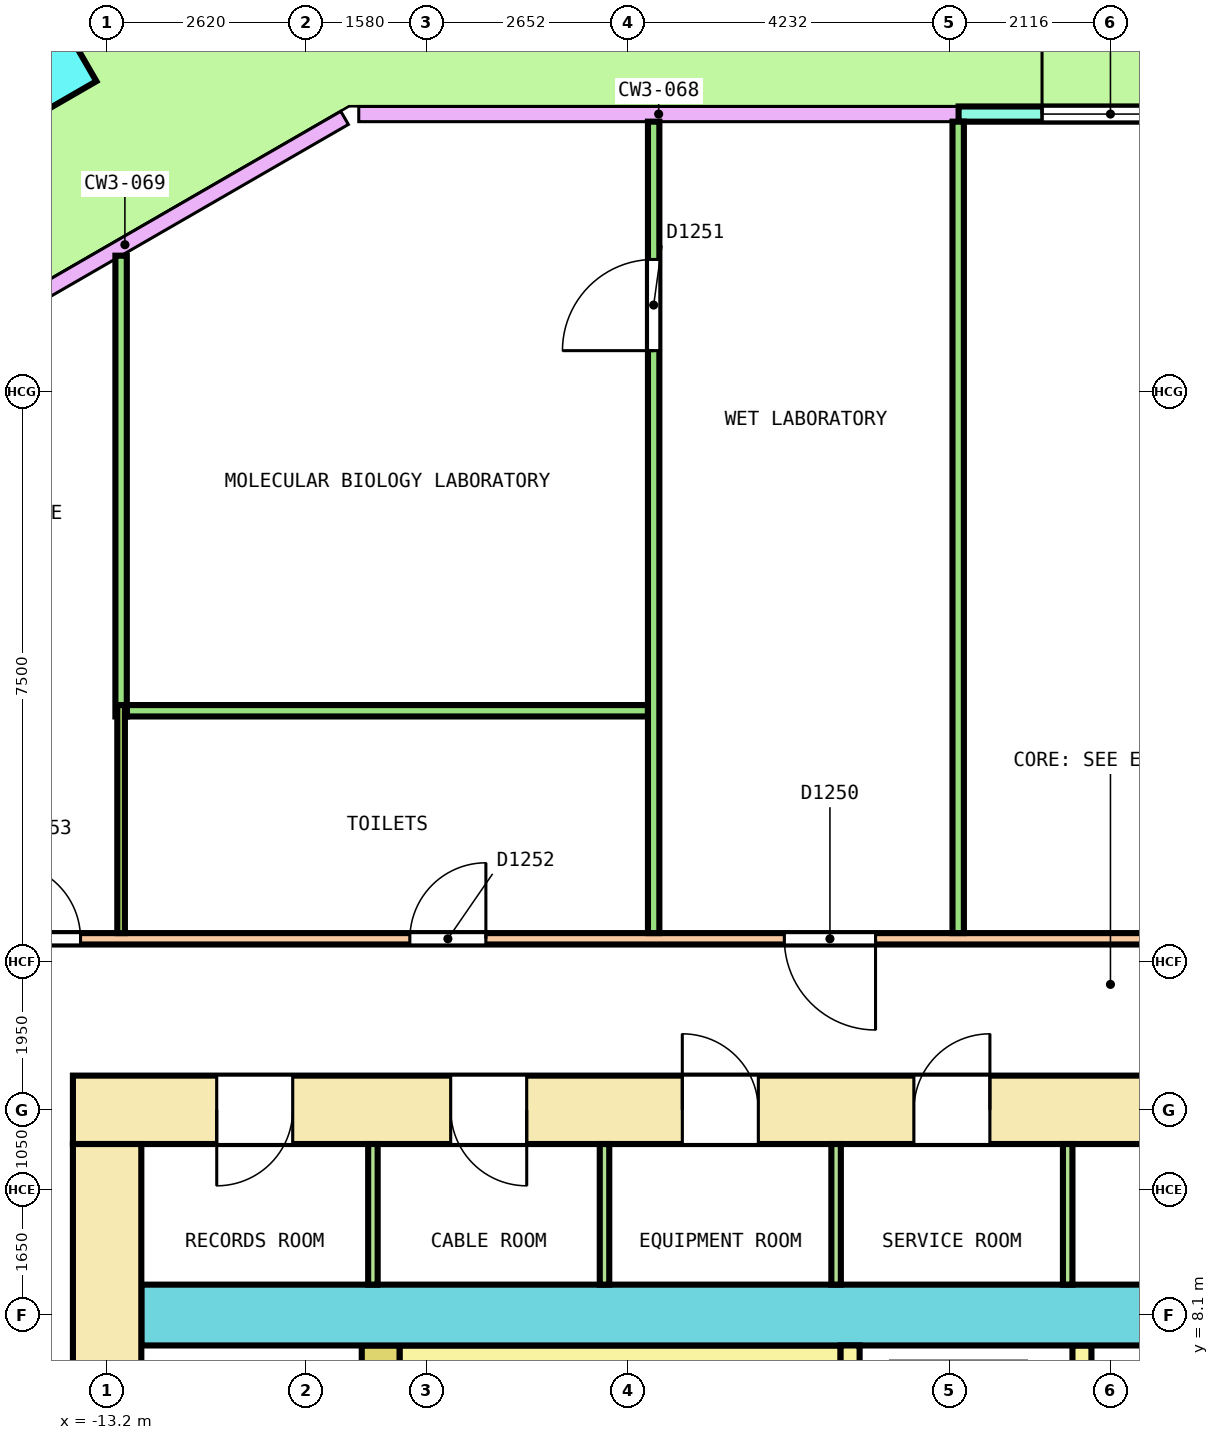
"""IFC4 building model, lengths in metres.
Left out: names, types, materials, properties, quantities, classifications, styles, units other than length and angle.
Written with IfcOpenShell. Run it as: python <this file> out.ifc"""

import sys

from ifc_helpers import new_model, si_unit, direction, frame, frame_2d, origin, origin_2d, place, context, subcontext, project, spatial, rectangle, extrude, element, fill, save


model = new_model("IFC4")
c1 = context("Model", 3, precision=1e-05, world=origin(), true_north=direction((0.0, 1.0)))
c2 = subcontext(c1, "Body", "Model", "MODEL_VIEW")
j1 = project(units=[si_unit("LENGTHUNIT", "METRE"), si_unit("PLANEANGLEUNIT", "RADIAN")], contexts=[c1])
p1 = place(None, origin())
s1 = spatial("IfcSite", under=j1, at=p1, CompositionType="ELEMENT")
p2 = place(p1, origin())
s2 = spatial("IfcBuilding", under=s1, at=p2, CompositionType="ELEMENT")
p3 = place(p2, frame((0.0, 0.0, 19.0)))
s3 = spatial("IfcBuildingStorey", under=s2, at=p3, CompositionType="ELEMENT", Elevation=19.0)
p4 = place(p3, frame((-14.366, 24.606, 0.0), z_axis=(-0.036205074038, 0.0, 0.999344381389), x_axis=(-0.865315435316, -0.500246354177, -0.031349362627)))
e1 = element("IfcColumn", 1, at=p4, inside=s3, PredefinedType="COLUMN", context=c2, shape_type="SweptSolid", body=[
    extrude(rectangle(XDim=1.5, YDim=1.5, at=origin_2d()), origin(), (0.0, 0.0, 1.0), 4.053),
])
p5 = place(p3, frame((1.998, 23.9, 0.0), z_axis=(0.0, 0.0, 1.0), x_axis=(-1.0, 0.0, 0.0)))
e2 = element("IfcWall", 2, at=p5, inside=s3, PredefinedType="SOLIDWALL", context=c2, shape_type="SweptSolid", body=[
    extrude(rectangle(XDim=3.996, YDim=0.2, at=frame_2d((1.998, 0.0))), origin(), (0.0, 0.0, 1.0), 4.1),
])
p6 = place(p5, frame((1.098, 0.0, 0.0)))
e3 = element("IfcOpeningElement", 3, at=p6, cuts=e2, PredefinedType="OPENING", context=c2, shape_type="SweptSolid", body=[
    extrude(rectangle(XDim=1.8, YDim=2.4, at=frame_2d((0.9, 1.2))), frame((0.0, 0.11, 0.0), z_axis=(0.0, -1.0, 0.0), x_axis=(1.0, 0.0, 0.0)), (0.0, 0.0, 1.0), 0.22),
])
p7 = place(p5, frame((1.098, 0.0, 2.55)))
e4 = element("IfcOpeningElement", 4, at=p7, cuts=e2, PredefinedType="OPENING", context=c2, shape_type="SweptSolid", body=[
    extrude(rectangle(XDim=1.8, YDim=0.45, at=frame_2d((0.9, 0.225))), frame((0.0, 0.11, 0.0), z_axis=(0.0, -1.0, 0.0), x_axis=(1.0, 0.0, 0.0)), (0.0, 0.0, 1.0), 0.22),
])
p8 = place(p3, frame((-13.65, 10.8, 0.0), z_axis=(0.0, 0.0, 1.0), x_axis=(1.0, 0.0, 0.0)))
e5 = element("IfcWall", 5, at=p8, inside=s3, PredefinedType="SHEAR", context=c2, shape_type="SweptSolid", body=[
    extrude(rectangle(XDim=27.3, YDim=0.9, at=frame_2d((13.65, 0.0))), origin(), (0.0, 0.0, 1.0), 4.1),
])
p9 = place(p8, frame((1.892, 0.0, 0.0)))
e6 = element("IfcOpeningElement", 6, at=p9, cuts=e5, PredefinedType="OPENING", context=c2, shape_type="SweptSolid", body=[
    extrude(rectangle(XDim=1.0, YDim=2.1, at=frame_2d((0.5, 1.05))), frame((0.0, 0.46, 0.0), z_axis=(0.0, -1.0, 0.0), x_axis=(1.0, 0.0, 0.0)), (0.0, 0.0, 1.0), 0.92),
])
p10 = place(p8, frame((4.97, 0.0, 0.0)))
e7 = element("IfcOpeningElement", 7, at=p10, cuts=e5, PredefinedType="OPENING", context=c2, shape_type="SweptSolid", body=[
    extrude(rectangle(XDim=1.0, YDim=2.1, at=frame_2d((0.5, 1.05))), frame((0.0, 0.46, 0.0), z_axis=(0.0, -1.0, 0.0), x_axis=(1.0, 0.0, 0.0)), (0.0, 0.0, 1.0), 0.92),
])
p11 = place(p8, frame((8.017, 0.0, 0.0)))
e8 = element("IfcOpeningElement", 8, at=p11, cuts=e5, PredefinedType="OPENING", context=c2, shape_type="SweptSolid", body=[
    extrude(rectangle(XDim=1.0, YDim=2.1, at=frame_2d((0.5, 1.05))), frame((0.0, 0.46, 0.0), z_axis=(0.0, -1.0, 0.0), x_axis=(1.0, 0.0, 0.0)), (0.0, 0.0, 1.0), 0.92),
])
p12 = place(p8, frame((11.064, 0.0, 0.0)))
e9 = element("IfcOpeningElement", 9, at=p12, cuts=e5, PredefinedType="OPENING", context=c2, shape_type="SweptSolid", body=[
    extrude(rectangle(XDim=1.0, YDim=2.1, at=frame_2d((0.5, 1.05))), frame((0.0, 0.46, 0.0), z_axis=(0.0, -1.0, 0.0), x_axis=(1.0, 0.0, 0.0)), (0.0, 0.0, 1.0), 0.92),
])
p13 = place(p8, frame((18.077, 0.0, 0.0)))
e10 = element("IfcOpeningElement", 10, at=p13, cuts=e5, PredefinedType="OPENING", context=c2, shape_type="SweptSolid", body=[
    extrude(rectangle(XDim=1.0, YDim=2.1, at=frame_2d((0.5, 1.05))), frame((0.0, 0.46, 0.0), z_axis=(0.0, -1.0, 0.0), x_axis=(1.0, 0.0, 0.0)), (0.0, 0.0, 1.0), 0.92),
])
p14 = place(p8, frame((21.206, 0.0, 0.0)))
e11 = element("IfcOpeningElement", 11, at=p14, cuts=e5, PredefinedType="OPENING", context=c2, shape_type="SweptSolid", body=[
    extrude(rectangle(XDim=1.0, YDim=2.1, at=frame_2d((0.5, 1.05))), frame((0.0, 0.46, 0.0), z_axis=(0.0, -1.0, 0.0), x_axis=(1.0, 0.0, 0.0)), (0.0, 0.0, 1.0), 0.92),
])
p15 = place(p8, frame((24.367, 0.0, 0.0)))
e12 = element("IfcOpeningElement", 12, at=p15, cuts=e5, PredefinedType="OPENING", context=c2, shape_type="SweptSolid", body=[
    extrude(rectangle(XDim=1.0, YDim=2.1, at=frame_2d((0.5, 1.05))), frame((0.0, 0.46, 0.0), z_axis=(0.0, -1.0, 0.0), x_axis=(1.0, 0.0, 0.0)), (0.0, 0.0, 1.0), 0.92),
])
p16 = place(p8, frame((14.575, 0.0, 0.0)))
e13 = element("IfcOpeningElement", 13, at=p16, cuts=e5, PredefinedType="OPENING", context=c2, shape_type="SweptSolid", body=[
    extrude(rectangle(XDim=1.4, YDim=2.1, at=frame_2d((0.7, 1.05))), frame((0.0, 0.46, 0.0), z_axis=(0.0, -1.0, 0.0), x_axis=(1.0, 0.0, 0.0)), (0.0, 0.0, 1.0), 0.92),
])
p17 = place(p3, frame((-13.2, -10.35, 0.0), z_axis=(0.0, 0.0, 1.0), x_axis=(0.0, 1.0, 0.0)))
e14 = element("IfcWall", 14, at=p17, inside=s3, PredefinedType="SHEAR", context=c2, shape_type="SweptSolid", body=[
    extrude(rectangle(XDim=20.7, YDim=0.9, at=frame_2d((10.35, 0.0))), origin(), (0.0, 0.0, 1.0), 4.1),
])
p18 = place(p17, frame((9.15, 0.0, 0.0)))
e15 = element("IfcOpeningElement", 15, at=p18, cuts=e14, PredefinedType="OPENING", context=c2, shape_type="SweptSolid", body=[
    extrude(rectangle(XDim=2.4, YDim=2.1, at=frame_2d((1.2, 1.05))), frame((0.0, 0.46, 0.0), z_axis=(0.0, -1.0, 0.0), x_axis=(1.0, 0.0, 0.0)), (0.0, 0.0, 1.0), 0.92),
])
p19 = place(p17, frame((16.05, 0.0, 0.0)))
e16 = element("IfcOpeningElement", 16, at=p19, cuts=e14, PredefinedType="OPENING", context=c2, shape_type="SweptSolid", body=[
    extrude(rectangle(XDim=1.2, YDim=2.1, at=frame_2d((0.6, 1.05))), frame((0.0, 0.46, 0.0), z_axis=(0.0, -1.0, 0.0), x_axis=(1.0, 0.0, 0.0)), (0.0, 0.0, 1.0), 0.92),
])
p20 = place(p17, frame((3.45, 0.0, 0.0)))
e17 = element("IfcOpeningElement", 17, at=p20, cuts=e14, PredefinedType="OPENING", context=c2, shape_type="SweptSolid", body=[
    extrude(rectangle(XDim=1.2, YDim=2.1, at=frame_2d((0.6, 1.05))), frame((0.0, 0.46, 0.0), z_axis=(0.0, -1.0, 0.0), x_axis=(1.0, 0.0, 0.0)), (0.0, 0.0, 1.0), 0.92),
])
p21 = place(p3, frame((-12.75, 8.1, 0.0), z_axis=(0.0, 0.0, 1.0), x_axis=(1.0, 0.0, 0.0)))
e18 = element("IfcWall", 18, at=p21, inside=s3, PredefinedType="SHEAR", context=c2, shape_type="SweptSolid", body=[
    extrude(rectangle(XDim=25.5, YDim=0.8, at=frame_2d((12.75, 0.0))), origin(), (0.0, 0.0, 1.0), 4.1),
])
p22 = place(p21, frame((13.675, 0.0, 0.0)))
e19 = element("IfcOpeningElement", 19, at=p22, cuts=e18, PredefinedType="OPENING", context=c2, shape_type="SweptSolid", body=[
    extrude(rectangle(XDim=1.4, YDim=2.1, at=frame_2d((0.7, 1.05))), frame((0.0, 0.41, 0.0), z_axis=(0.0, -1.0, 0.0), x_axis=(1.0, 0.0, 0.0)), (0.0, 0.0, 1.0), 0.82),
])
p23 = place(p3, frame((-9.6, -7.7, 0.0), z_axis=(0.0, 0.0, 1.0), x_axis=(0.0, 1.0, 0.0)))
e20 = element("IfcWall", 20, at=p23, inside=s3, PredefinedType="SHEAR", context=c2, shape_type="SweptSolid", body=[
    extrude(rectangle(XDim=15.4, YDim=0.5, at=frame_2d((7.7, 0.0))), origin(), (0.0, 0.0, 1.0), 4.1),
])
p24 = place(p23, frame((6.5, 0.0, 0.0)))
e21 = element("IfcOpeningElement", 21, at=p24, cuts=e20, PredefinedType="OPENING", context=c2, shape_type="SweptSolid", body=[
    extrude(rectangle(XDim=2.4, YDim=2.1, at=frame_2d((1.2, 1.05))), frame((0.0, 0.26, 0.0), z_axis=(0.0, -1.0, 0.0), x_axis=(1.0, 0.0, 0.0)), (0.0, 0.0, 1.0), 0.52),
])
p25 = place(p23, frame((13.4, 0.0, 0.0)))
e22 = element("IfcOpeningElement", 22, at=p25, cuts=e20, PredefinedType="OPENING", context=c2, shape_type="SweptSolid", body=[
    extrude(rectangle(XDim=1.2, YDim=2.1, at=frame_2d((0.6, 1.05))), frame((0.0, 0.26, 0.0), z_axis=(0.0, -1.0, 0.0), x_axis=(1.0, 0.0, 0.0)), (0.0, 0.0, 1.0), 0.52),
])
p26 = place(p23, frame((0.8, 0.0, 0.0)))
e23 = element("IfcOpeningElement", 23, at=p26, cuts=e20, PredefinedType="OPENING", context=c2, shape_type="SweptSolid", body=[
    extrude(rectangle(XDim=1.2, YDim=2.1, at=frame_2d((0.6, 1.05))), frame((0.0, 0.26, 0.0), z_axis=(0.0, -1.0, 0.0), x_axis=(1.0, 0.0, 0.0)), (0.0, 0.0, 1.0), 0.52),
])
p27 = place(p3, frame((-9.35, 7.575, 0.0), z_axis=(0.0, 0.0, 1.0), x_axis=(1.0, 0.0, 0.0)))
e24 = element("IfcWall", 24, at=p27, inside=s3, PredefinedType="SOLIDWALL", context=c2, shape_type="SweptSolid", body=[
    extrude(rectangle(XDim=5.8, YDim=0.25, at=frame_2d((2.9, 0.0))), origin(), (0.0, 0.0, 1.0), 4.1),
])
p28 = place(p3, frame((-3.425, 4.9, 0.0), z_axis=(0.0, 0.0, 1.0), x_axis=(0.0, 1.0, 0.0)))
e25 = element("IfcWall", 25, at=p28, inside=s3, PredefinedType="SOLIDWALL", context=c2, shape_type="SweptSolid", body=[
    extrude(rectangle(XDim=2.8, YDim=0.25, at=frame_2d((1.4, 0.0))), origin(), (0.0, 0.0, 1.0), 4.1),
])
p29 = place(p3, frame((-0.375, 4.9, 0.0), z_axis=(0.0, 0.0, 1.0), x_axis=(0.0, 1.0, 0.0)))
e26 = element("IfcWall", 26, at=p29, inside=s3, PredefinedType="SOLIDWALL", context=c2, shape_type="SweptSolid", body=[
    extrude(rectangle(XDim=2.8, YDim=0.25, at=frame_2d((1.4, 0.0))), origin(), (0.0, 0.0, 1.0), 4.1),
])
p30 = place(p29, frame((0.7, 0.0, 0.0)))
e27 = element("IfcOpeningElement", 27, at=p30, cuts=e26, PredefinedType="OPENING", context=c2, shape_type="SweptSolid", body=[
    extrude(rectangle(XDim=1.4, YDim=2.1, at=frame_2d((0.7, 1.05))), frame((0.0, 0.135, 0.0), z_axis=(0.0, -1.0, 0.0), x_axis=(1.0, 0.0, 0.0)), (0.0, 0.0, 1.0), 0.27),
])
for number, where, z_axis, x_axis in (
    (28, (-9.703, 8.5, 0.0), (0.0, 0.0, 1.0), (0.0, 1.0, 0.0)),
    (29, (-6.656, 8.5, 0.0), (0.0, 0.0, 1.0), (0.0, 1.0, 0.0)),
    (30, (-3.609, 8.5, 0.0), (0.0, 0.0, 1.0), (0.0, 1.0, 0.0)),
    (31, (-0.562, 8.5, 0.0), (0.0, 0.0, 1.0), (0.0, 1.0, 0.0)),
):
    element("IfcWall", number, at=place(p3, frame(where, z_axis=z_axis, x_axis=x_axis)), inside=s3, PredefinedType="PARTITIONING", context=c2, shape_type="SweptSolid", body=[
        extrude(rectangle(XDim=1.85, YDim=0.125, at=frame_2d((0.925, 0.0))), origin(), (0.0, 0.0, 1.0), 4.1),
    ])
p31 = place(p3, frame((-15.375, 13.05, 0.0), z_axis=(0.0, 0.0, 1.0), x_axis=(1.0, 0.0, 0.0)))
e32 = element("IfcWall", 32, at=p31, inside=s3, PredefinedType="PARTITIONING", context=c2, shape_type="SweptSolid", body=[
    extrude(rectangle(XDim=30.75, YDim=0.15, at=frame_2d((15.375, 0.0))), origin(), (0.0, 0.0, 1.0), 3.05),
])
p32 = place(p31, frame((27.608, 0.0, 0.0)))
e33 = element("IfcOpeningElement", 33, at=p32, cuts=e32, PredefinedType="OPENING", context=c2, shape_type="SweptSolid", body=[
    extrude(rectangle(XDim=1.0, YDim=2.1, at=frame_2d((0.5, 1.05))), frame((0.0, 0.085, 0.0), z_axis=(0.0, -1.0, 0.0), x_axis=(1.0, 0.0, 0.0)), (0.0, 0.0, 1.0), 0.17),
])
p33 = place(p31, frame((23.465, 0.0, 0.0)))
e34 = element("IfcOpeningElement", 34, at=p33, cuts=e32, PredefinedType="OPENING", context=c2, shape_type="SweptSolid", body=[
    extrude(rectangle(XDim=1.0, YDim=2.1, at=frame_2d((0.5, 1.05))), frame((0.0, 0.085, 0.0), z_axis=(0.0, -1.0, 0.0), x_axis=(1.0, 0.0, 0.0)), (0.0, 0.0, 1.0), 0.17),
])
p34 = place(p31, frame((17.695, 0.0, 0.0)))
e35 = element("IfcOpeningElement", 35, at=p34, cuts=e32, PredefinedType="OPENING", context=c2, shape_type="SweptSolid", body=[
    extrude(rectangle(XDim=1.2, YDim=2.1, at=frame_2d((0.6, 1.05))), frame((0.0, 0.085, 0.0), z_axis=(0.0, -1.0, 0.0), x_axis=(1.0, 0.0, 0.0)), (0.0, 0.0, 1.0), 0.17),
])
p35 = place(p31, frame((11.084, 0.0, 0.0)))
e36 = element("IfcOpeningElement", 36, at=p35, cuts=e32, PredefinedType="OPENING", context=c2, shape_type="SweptSolid", body=[
    extrude(rectangle(XDim=1.2, YDim=2.1, at=frame_2d((0.6, 1.05))), frame((0.0, 0.085, 0.0), z_axis=(0.0, -1.0, 0.0), x_axis=(1.0, 0.0, 0.0)), (0.0, 0.0, 1.0), 0.17),
])
p36 = place(p31, frame((6.158, 0.0, 0.0)))
e37 = element("IfcOpeningElement", 37, at=p36, cuts=e32, PredefinedType="OPENING", context=c2, shape_type="SweptSolid", body=[
    extrude(rectangle(XDim=1.0, YDim=2.1, at=frame_2d((0.5, 1.05))), frame((0.0, 0.085, 0.0), z_axis=(0.0, -1.0, 0.0), x_axis=(1.0, 0.0, 0.0)), (0.0, 0.0, 1.0), 0.17),
])
p37 = place(p31, frame((0.825, 0.0, 0.0)))
e38 = element("IfcOpeningElement", 38, at=p37, cuts=e32, PredefinedType="OPENING", context=c2, shape_type="SweptSolid", body=[
    extrude(rectangle(XDim=1.0, YDim=2.1, at=frame_2d((0.5, 1.05))), frame((0.0, 0.085, 0.0), z_axis=(0.0, -1.0, 0.0), x_axis=(1.0, 0.0, 0.0)), (0.0, 0.0, 1.0), 0.17),
])
p38 = place(p3, frame((-12.941, 16.05, 0.0), z_axis=(0.0, 0.0, 1.0), x_axis=(1.0, 0.0, 0.0)))
e39 = element("IfcWall", 39, at=p38, inside=s3, PredefinedType="PARTITIONING", context=c2, shape_type="SweptSolid", body=[
    extrude(rectangle(XDim=6.856, YDim=0.15, at=frame_2d((3.428, 0.0))), origin(), (0.0, 0.0, 1.0), 3.05),
])
p39 = place(p3, frame((-2.003, 13.125, 0.0), z_axis=(0.0, 0.0, 1.0), x_axis=(0.0, 1.0, 0.0)))
e40 = element("IfcWall", 40, at=p39, inside=s3, PredefinedType="PARTITIONING", context=c2, shape_type="SweptSolid", body=[
    extrude(rectangle(XDim=10.675, YDim=0.15, at=frame_2d((5.337, 0.0))), origin(), (0.0, 0.0, 1.0), 3.05),
])
p40 = place(p3, frame((-6.01, 13.125, 0.0), z_axis=(0.0, 0.0, 1.0), x_axis=(0.0, 1.0, 0.0)))
e41 = element("IfcWall", 41, at=p40, inside=s3, PredefinedType="PARTITIONING", context=c2, shape_type="SweptSolid", body=[
    extrude(rectangle(XDim=10.675, YDim=0.15, at=frame_2d((5.337, 0.0))), origin(), (0.0, 0.0, 1.0), 3.05),
])
p41 = place(p40, frame((7.663, 0.0, 0.0)))
e42 = element("IfcOpeningElement", 42, at=p41, cuts=e41, PredefinedType="OPENING", context=c2, shape_type="SweptSolid", body=[
    extrude(rectangle(XDim=1.2, YDim=2.1, at=frame_2d((0.6, 1.05))), frame((0.0, 0.085, 0.0), z_axis=(0.0, -1.0, 0.0), x_axis=(1.0, 0.0, 0.0)), (0.0, 0.0, 1.0), 0.17),
])
p42 = place(p3, frame((-13.016, 15.975, 0.0), z_axis=(0.0, 0.0, 1.0), x_axis=(0.0, 1.0, 0.0)))
e43 = element("IfcWall", 43, at=p42, inside=s3, PredefinedType="PARTITIONING", context=c2, shape_type="SweptSolid", body=[
    extrude(rectangle(XDim=6.062, YDim=0.15, at=frame_2d((3.031, 0.0))), origin(), (0.0, 0.0, 1.0), 3.05),
])
p43 = place(p3, frame((-13.016, 13.125, 0.0), z_axis=(0.0, 0.0, 1.0), x_axis=(0.0, 1.0, 0.0)))
e44 = element("IfcWall", 44, at=p43, inside=s3, PredefinedType="PARTITIONING", context=c2, shape_type="SweptSolid", body=[
    extrude(rectangle(XDim=3.0, YDim=0.1, at=frame_2d((1.5, 0.0))), origin(), (0.0, 0.0, 1.0), 3.05),
])
p44 = place(p6, origin())
e45 = element("IfcDoor", 45, at=p44, inside=s3, OperationType="DOUBLE_DOOR_SINGLE_SWING", PredefinedType="DOOR", context=c2, shape_type="SweptSolid", body=[
    extrude(rectangle(XDim=1.8, YDim=2.4, at=frame_2d((0.9, 1.2))), frame((0.0, 0.025, 0.0), z_axis=(0.0, -1.0, 0.0), x_axis=(1.0, 0.0, 0.0)), (0.0, 0.0, 1.0), 0.05),
])
fill(e3, e45)
p45 = place(p7, origin())
e46 = element("IfcWindow", 46, at=p45, inside=s3, PartitioningType="SINGLE_PANEL", PredefinedType="WINDOW", context=c2, shape_type="SweptSolid", body=[
    extrude(rectangle(XDim=1.8, YDim=0.45, at=frame_2d((0.9, 0.225))), frame((0.0, 0.03, 0.0), z_axis=(0.0, -1.0, 0.0), x_axis=(1.0, 0.0, 0.0)), (0.0, 0.0, 1.0), 0.06),
])
fill(e4, e46)
p46 = place(p9, origin())
e47 = element("IfcDoor", 47, at=p46, inside=s3, OperationType="SINGLE_SWING_RIGHT", PredefinedType="DOOR", context=c2, shape_type="SweptSolid", body=[
    extrude(rectangle(XDim=1.0, YDim=2.1, at=frame_2d((0.5, 1.05))), frame((0.0, 0.3, 0.0), z_axis=(0.0, -1.0, 0.0), x_axis=(1.0, 0.0, 0.0)), (0.0, 0.0, 1.0), 0.6),
])
fill(e6, e47)
p47 = place(p10, origin())
e48 = element("IfcDoor", 48, at=p47, inside=s3, OperationType="SINGLE_SWING_LEFT", PredefinedType="DOOR", context=c2, shape_type="SweptSolid", body=[
    extrude(rectangle(XDim=1.0, YDim=2.1, at=frame_2d((0.5, 1.05))), frame((0.0, 0.3, 0.0), z_axis=(0.0, -1.0, 0.0), x_axis=(1.0, 0.0, 0.0)), (0.0, 0.0, 1.0), 0.6),
])
fill(e7, e48)
p48 = place(p11, origin())
e49 = element("IfcDoor", 49, at=p48, inside=s3, OperationType="SINGLE_SWING_RIGHT", PredefinedType="DOOR", context=c2, shape_type="SweptSolid", body=[
    extrude(rectangle(XDim=1.0, YDim=2.1, at=frame_2d((0.5, 1.05))), frame((0.0, 0.3, 0.0), z_axis=(0.0, -1.0, 0.0), x_axis=(1.0, 0.0, 0.0)), (0.0, 0.0, 1.0), 0.6),
])
fill(e8, e49)
p49 = place(p12, origin())
e50 = element("IfcDoor", 50, at=p49, inside=s3, OperationType="SINGLE_SWING_LEFT", PredefinedType="DOOR", context=c2, shape_type="SweptSolid", body=[
    extrude(rectangle(XDim=1.0, YDim=2.1, at=frame_2d((0.5, 1.05))), frame((0.0, 0.3, 0.0), z_axis=(0.0, -1.0, 0.0), x_axis=(1.0, 0.0, 0.0)), (0.0, 0.0, 1.0), 0.6),
])
fill(e9, e50)
p50 = place(p35, origin())
e51 = element("IfcDoor", 51, at=p50, inside=s3, OperationType="DOUBLE_DOOR_SINGLE_SWING", PredefinedType="DOOR", context=c2, shape_type="SweptSolid", body=[
    extrude(rectangle(XDim=1.2, YDim=2.1, at=frame_2d((0.6, 1.05))), frame((0.0, 0.025, 0.0), z_axis=(0.0, -1.0, 0.0), x_axis=(1.0, 0.0, 0.0)), (0.0, 0.0, 1.0), 0.05),
])
fill(e36, e51)
p51 = place(p41, origin())
e52 = element("IfcDoor", 52, at=p51, inside=s3, OperationType="DOUBLE_DOOR_SINGLE_SWING", PredefinedType="DOOR", context=c2, shape_type="SweptSolid", body=[
    extrude(rectangle(XDim=1.2, YDim=2.1, at=frame_2d((0.6, 1.05))), frame((0.0, 0.025, 0.0), z_axis=(0.0, -1.0, 0.0), x_axis=(1.0, 0.0, 0.0)), (0.0, 0.0, 1.0), 0.05),
])
fill(e42, e52)
p52 = place(p36, origin())
e53 = element("IfcDoor", 53, at=p52, inside=s3, OperationType="SINGLE_SWING_RIGHT", PredefinedType="DOOR", context=c2, shape_type="SweptSolid", body=[
    extrude(rectangle(XDim=1.0, YDim=2.1, at=frame_2d((0.5, 1.05))), frame((0.0, 0.025, 0.0), z_axis=(0.0, -1.0, 0.0), x_axis=(1.0, 0.0, 0.0)), (0.0, 0.0, 1.0), 0.05),
])
fill(e37, e53)
p53 = place(p37, origin())
e54 = element("IfcDoor", 54, at=p53, inside=s3, OperationType="SINGLE_SWING_RIGHT", PredefinedType="DOOR", context=c2, shape_type="SweptSolid", body=[
    extrude(rectangle(XDim=1.0, YDim=2.1, at=frame_2d((0.5, 1.05))), frame((0.0, 0.025, 0.0), z_axis=(0.0, -1.0, 0.0), x_axis=(1.0, 0.0, 0.0)), (0.0, 0.0, 1.0), 0.05),
])
fill(e38, e54)
save(model, sys.argv[1])
